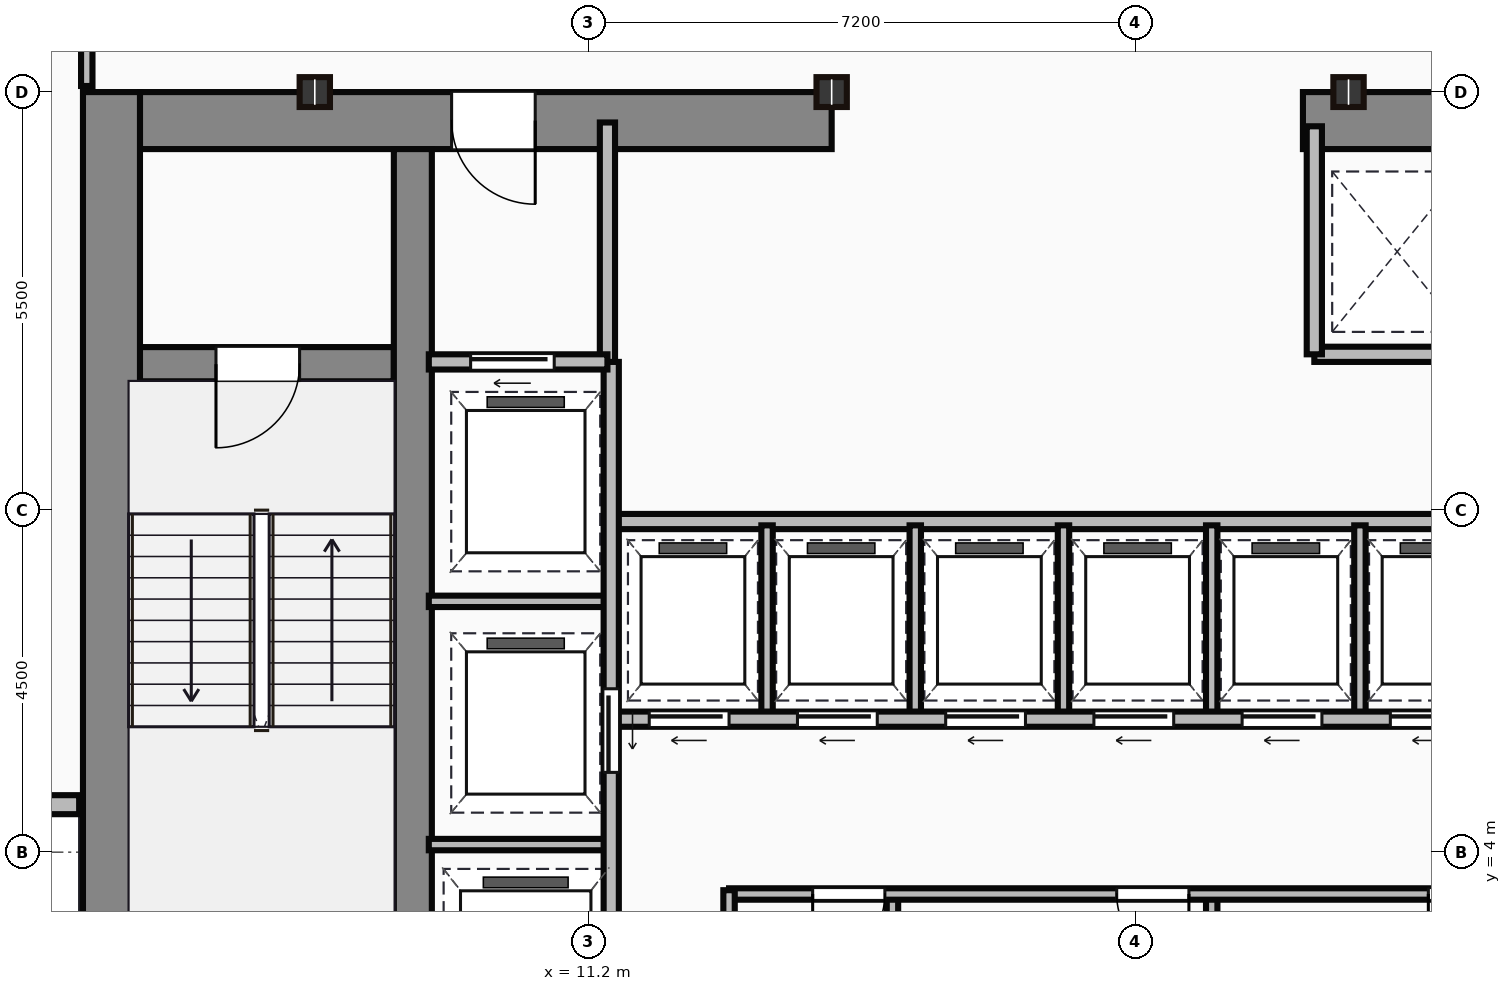
"""IFC4 building model, lengths in metres.
Left out: names, types, materials, properties, quantities, classifications, styles, units other than length and angle.
Written with IfcOpenShell. Run it as: python <this file> out.ifc"""

import sys

from ifc_helpers import new_model, si_unit, direction, frame, frame_2d, origin, origin_2d, place, context, subcontext, project, spatial, rectangle, i_section, extrude, source, transform, mapped, element, fill, save


model = new_model("IFC4")
c1 = context("Model", 3, precision=1e-05, world=origin(), true_north=direction((0.0, 1.0)))
c2 = subcontext(c1, "Body", "Model", "MODEL_VIEW")
j1 = project(units=[si_unit("LENGTHUNIT", "METRE"), si_unit("PLANEANGLEUNIT", "RADIAN")], contexts=[c1])
p1 = place(None, origin())
s1 = spatial("IfcSite", under=j1, at=p1, CompositionType="ELEMENT")
p2 = place(p1, origin())
s2 = spatial("IfcBuilding", under=s1, at=p2, CompositionType="ELEMENT")
p3 = place(p2, frame((0.0, 0.0, 114.2)))
s3 = spatial("IfcBuildingStorey", under=s2, at=p3, CompositionType="ELEMENT", Elevation=114.2)
m1 = source(origin(), c2, "Body", "SweptSolid", [
    extrude(rectangle(XDim=13.1, YDim=0.75, at=frame_2d((6.55, 0.0))), origin(), (0.0, 0.0, 1.0), 3.65),
])
p4 = place(p3, frame((4.925, 0.9, 0.0), z_axis=(0.0, 0.0, 1.0), x_axis=(0.0, 1.0, 0.0)))
e1 = element("IfcWall", 1, at=p4, inside=s3, PredefinedType="SHEAR", context=c2, shape_type="MappedRepresentation", body=[
    mapped(m1, transform((0.0, 0.0, 0.0))),
])
m2 = source(origin(), c2, "Body", "SweptSolid", [
    extrude(rectangle(XDim=9.1, YDim=0.75, at=frame_2d((4.55, 0.0))), origin(), (0.0, 0.0, 1.0), 3.65),
])
p5 = place(p3, frame((5.3, 13.625, 0.0), z_axis=(0.0, 0.0, 1.0), x_axis=(1.0, 0.0, 0.0)))
e2 = element("IfcWall", 2, at=p5, inside=s3, PredefinedType="SHEAR", context=c2, shape_type="MappedRepresentation", body=[
    mapped(m2, transform((0.0, 0.0, 0.0))),
])
p6 = place(p5, frame((4.1, 0.0, 0.0)))
e3 = element("IfcOpeningElement", 3, at=p6, cuts=e2, PredefinedType="OPENING", context=c2, shape_type="SweptSolid", body=[
    extrude(rectangle(XDim=1.1, YDim=2.15, at=frame_2d((0.55, 1.075))), frame((0.0, 0.385, 0.0), z_axis=(0.0, -1.0, 0.0), x_axis=(1.0, 0.0, 0.0)), (0.0, 0.0, 1.0), 0.77),
])
m3 = source(origin(), c2, "Body", "SweptSolid", [
    extrude(rectangle(XDim=12.6, YDim=0.75, at=frame_2d((6.3, 0.0))), origin(), (0.0, 0.0, 1.0), 3.65),
])
p7 = place(p3, frame((20.6, 13.625, 0.0), z_axis=(0.0, 0.0, 1.0), x_axis=(1.0, 0.0, 0.0)))
e4 = element("IfcWall", 4, at=p7, inside=s3, PredefinedType="SHEAR", context=c2, shape_type="MappedRepresentation", body=[
    mapped(m3, transform((0.0, 0.0, 0.0))),
])
p8 = place(p7, frame((9.25, 0.0, 0.0)))
e5 = element("IfcOpeningElement", 5, at=p8, cuts=e4, PredefinedType="OPENING", context=c2, shape_type="SweptSolid", body=[
    extrude(rectangle(XDim=1.1, YDim=2.15, at=frame_2d((0.55, 1.075))), frame((0.0, 0.385, 0.0), z_axis=(0.0, -1.0, 0.0), x_axis=(1.0, 0.0, 0.0)), (0.0, 0.0, 1.0), 0.77),
])
m4 = source(origin(), c2, "Body", "SweptSolid", [
    extrude(rectangle(XDim=12.35, YDim=0.5, at=frame_2d((6.175, 0.0))), origin(), (0.0, 0.0, 1.0), 3.65),
])
p9 = place(p3, frame((8.89, 0.9, 0.0), z_axis=(0.0, 0.0, 1.0), x_axis=(0.0, 1.0, 0.0)))
e6 = element("IfcWall", 6, at=p9, inside=s3, PredefinedType="SHEAR", context=c2, shape_type="MappedRepresentation", body=[
    mapped(m4, transform((0.0, 0.0, 0.0))),
])
m5 = source(origin(), c2, "Body", "SweptSolid", [
    extrude(rectangle(XDim=3.39, YDim=0.45, at=frame_2d((1.695, 0.0))), origin(), (0.0, 0.0, 1.0), 3.65),
])
p10 = place(p3, frame((5.25, 10.42, 0.0), z_axis=(0.0, 0.0, 1.0), x_axis=(1.0, 0.0, 0.0)))
e7 = element("IfcWall", 7, at=p10, inside=s3, PredefinedType="SHEAR", context=c2, shape_type="MappedRepresentation", body=[
    mapped(m5, transform((0.0, 0.0, 0.0))),
])
p11 = place(p10, frame((1.05, 0.0, 0.0)))
e8 = element("IfcOpeningElement", 8, at=p11, cuts=e7, PredefinedType="OPENING", context=c2, shape_type="SweptSolid", body=[
    extrude(rectangle(XDim=1.1, YDim=2.15, at=frame_2d((0.55, 1.075))), frame((0.0, 0.235, 0.0), z_axis=(0.0, -1.0, 0.0), x_axis=(1.0, 0.0, 0.0)), (0.0, 0.0, 1.0), 0.47),
])
m6 = source(origin(), c2, "Body", "SweptSolid", [
    extrude(i_section(OverallWidth=0.399, OverallDepth=0.393, WebThickness=0.023, FlangeThickness=0.037, at=origin_2d()), origin(), (0.0, 0.0, 1.0), 3.65),
])
for number, where, z_axis, x_axis in (
    (9, (7.6, 14.0, 0.0), (0.0, 0.0, 1.0), (1.0, 0.0, 0.0)),
    (10, (14.4, 14.0, 0.0), (0.0, 0.0, 1.0), (1.0, 0.0, 0.0)),
    (11, (21.2, 14.0, 0.0), (0.0, 0.0, 1.0), (1.0, 0.0, 0.0)),
):
    element("IfcColumn", number, at=place(p3, frame(where, z_axis=z_axis, x_axis=x_axis)), inside=s3, PredefinedType="COLUMN", context=c2, shape_type="MappedRepresentation", body=[
        mapped(m6, transform((0.0, 0.0, 0.0))),
    ])
m7 = source(origin(), c2, "Body", "SweptSolid", [
    extrude(rectangle(XDim=4.5, YDim=0.25, at=frame_2d((2.25, 0.0))), origin(), (0.0, 0.0, 1.0), 3.4),
])
p12 = place(p3, frame((0.0, 4.625, 0.0), z_axis=(0.0, 0.0, 1.0), x_axis=(1.0, 0.0, 0.0)))
e12 = element("IfcWall", 12, at=p12, inside=s3, PredefinedType="STANDARD", context=c2, shape_type="MappedRepresentation", body=[
    mapped(m7, transform((0.0, 0.0, 0.0))),
])
m8 = source(origin(), c2, "Body", "SweptSolid", [
    extrude(rectangle(XDim=3.18, YDim=0.2, at=frame_2d((1.59, 0.0))), origin(), (0.0, 0.0, 1.0), 3.4),
])
p13 = place(p3, frame((11.45, 10.42, 0.0), z_axis=(0.0, 0.0, 1.0), x_axis=(0.0, 1.0, 0.0)))
e13 = element("IfcWall", 13, at=p13, inside=s3, PredefinedType="PARTITIONING", context=c2, shape_type="MappedRepresentation", body=[
    mapped(m8, transform((0.0, 0.0, 0.0))),
])
m9 = source(origin(), c2, "Body", "SweptSolid", [
    extrude(rectangle(XDim=2.35, YDim=0.2, at=frame_2d((1.175, 0.0))), origin(), (0.0, 0.0, 1.0), 3.4),
])
p14 = place(p3, frame((9.1, 10.45, 0.0), z_axis=(0.0, 0.0, 1.0), x_axis=(1.0, 0.0, 0.0)))
e14 = element("IfcWall", 14, at=p14, inside=s3, PredefinedType="PARTITIONING", context=c2, shape_type="MappedRepresentation", body=[
    mapped(m9, transform((0.0, 0.0, 0.0))),
])
p15 = place(p14, frame((0.55, 0.0, 0.0)))
e15 = element("IfcOpeningElement", 15, at=p15, cuts=e14, PredefinedType="OPENING", context=c2, shape_type="SweptSolid", body=[
    extrude(rectangle(XDim=1.1, YDim=2.15, at=frame_2d((0.55, 1.075))), frame((0.0, 0.11, 0.0), z_axis=(0.0, -1.0, 0.0), x_axis=(1.0, 0.0, 0.0)), (0.0, 0.0, 1.0), 0.22),
])
m10 = source(origin(), c2, "Body", "SweptSolid", [
    extrude(rectangle(XDim=9.6, YDim=0.2, at=frame_2d((4.8, 0.0))), origin(), (0.0, 0.0, 1.0), 3.4),
])
p16 = place(p3, frame((11.5, 0.85, 0.0), z_axis=(0.0, 0.0, 1.0), x_axis=(0.0, 1.0, 0.0)))
e16 = element("IfcWall", 16, at=p16, inside=s3, PredefinedType="PARTITIONING", context=c2, shape_type="MappedRepresentation", body=[
    mapped(m10, transform((0.0, 0.0, 0.0))),
])
p17 = place(p16, frame((4.2, 0.0, 0.0)))
e17 = element("IfcOpeningElement", 17, at=p17, cuts=e16, PredefinedType="OPENING", context=c2, shape_type="SweptSolid", body=[
    extrude(rectangle(XDim=1.1, YDim=2.15, at=frame_2d((0.55, 1.075))), frame((0.0, 0.11, 0.0), z_axis=(0.0, -1.0, 0.0), x_axis=(1.0, 0.0, 0.0)), (0.0, 0.0, 1.0), 0.22),
])
p18 = place(p16, frame((0.9, 0.0, 0.0)))
e18 = element("IfcOpeningElement", 18, at=p18, cuts=e16, PredefinedType="OPENING", context=c2, shape_type="SweptSolid", body=[
    extrude(rectangle(XDim=1.2, YDim=2.15, at=frame_2d((0.6, 1.075))), frame((0.0, 0.11, 0.0), z_axis=(0.0, -1.0, 0.0), x_axis=(1.0, 0.0, 0.0)), (0.0, 0.0, 1.0), 0.22),
])
m11 = source(origin(), c2, "Body", "SweptSolid", [
    extrude(rectangle(XDim=2.4, YDim=0.15, at=frame_2d((1.2, 0.0))), origin(), (0.0, 0.0, 1.0), 3.4),
])
for number, where, z_axis, x_axis in (
    (19, (9.1, 4.1, 0.0), (0.0, 0.0, 1.0), (1.0, 0.0, 0.0)),
    (20, (9.1, 7.3, 0.0), (0.0, 0.0, 1.0), (1.0, 0.0, 0.0)),
):
    element("IfcWall", number, at=place(p3, frame(where, z_axis=z_axis, x_axis=x_axis)), inside=s3, PredefinedType="PARTITIONING", context=c2, shape_type="MappedRepresentation", body=[
        mapped(m11, transform((0.0, 0.0, 0.0))),
    ])
m12 = source(origin(), c2, "Body", "SweptSolid", [
    extrude(rectangle(XDim=2.65, YDim=0.15, at=frame_2d((1.325, 0.0))), origin(), (0.0, 0.0, 1.0), 3.4),
])
p19 = place(p3, frame((13.05, 0.85, 0.0), z_axis=(0.0, 0.0, 1.0), x_axis=(0.0, 1.0, 0.0)))
e21 = element("IfcWall", 21, at=p19, inside=s3, PredefinedType="PARTITIONING", context=c2, shape_type="MappedRepresentation", body=[
    mapped(m12, transform((0.0, 0.0, 0.0))),
])
m13 = source(origin(), c2, "Body", "SweptSolid", [
    extrude(rectangle(XDim=10.35, YDim=0.15, at=frame_2d((5.175, 0.0))), origin(), (0.0, 0.0, 1.0), 3.4),
])
p20 = place(p3, frame((13.05, 3.45, 0.0), z_axis=(0.0, 0.0, 1.0), x_axis=(1.0, 0.0, 0.0)))
e22 = element("IfcWall", 22, at=p20, inside=s3, PredefinedType="PARTITIONING", context=c2, shape_type="MappedRepresentation", body=[
    mapped(m13, transform((0.0, 0.0, 0.0))),
])
p21 = place(p20, frame((1.1, 0.0, 0.0)))
e23 = element("IfcOpeningElement", 23, at=p21, cuts=e22, PredefinedType="OPENING", context=c2, shape_type="SweptSolid", body=[
    extrude(rectangle(XDim=0.95, YDim=2.15, at=frame_2d((0.475, 1.075))), frame((0.0, 0.085, 0.0), z_axis=(0.0, -1.0, 0.0), x_axis=(1.0, 0.0, 0.0)), (0.0, 0.0, 1.0), 0.17),
])
p22 = place(p20, frame((5.1, 0.0, 0.0)))
e24 = element("IfcOpeningElement", 24, at=p22, cuts=e22, PredefinedType="OPENING", context=c2, shape_type="SweptSolid", body=[
    extrude(rectangle(XDim=0.95, YDim=2.15, at=frame_2d((0.475, 1.075))), frame((0.0, 0.085, 0.0), z_axis=(0.0, -1.0, 0.0), x_axis=(1.0, 0.0, 0.0)), (0.0, 0.0, 1.0), 0.17),
])
p23 = place(p20, frame((9.2, 0.0, 0.0)))
e25 = element("IfcOpeningElement", 25, at=p23, cuts=e22, PredefinedType="OPENING", context=c2, shape_type="SweptSolid", body=[
    extrude(rectangle(XDim=0.95, YDim=2.15, at=frame_2d((0.475, 1.075))), frame((0.0, 0.085, 0.0), z_axis=(0.0, -1.0, 0.0), x_axis=(1.0, 0.0, 0.0)), (0.0, 0.0, 1.0), 0.17),
])
m14 = source(origin(), c2, "Body", "SweptSolid", [
    extrude(rectangle(XDim=2.6, YDim=0.15, at=frame_2d((1.3, 0.0))), origin(), (0.0, 0.0, 1.0), 3.4),
])
for number, where, z_axis, x_axis in (
    (26, (15.2, 0.85, 0.0), (0.0, 0.0, 1.0), (0.0, 1.0, 0.0)),
    (27, (19.4, 0.85, 0.0), (0.0, 0.0, 1.0), (0.0, 1.0, 0.0)),
):
    element("IfcWall", number, at=place(p3, frame(where, z_axis=z_axis, x_axis=x_axis)), inside=s3, PredefinedType="PARTITIONING", context=c2, shape_type="MappedRepresentation", body=[
        mapped(m14, transform((0.0, 0.0, 0.0))),
    ])
m15 = source(origin(), c2, "Body", "SweptSolid", [
    extrude(rectangle(XDim=11.85, YDim=0.2, at=frame_2d((5.925, 0.0))), origin(), (0.0, 0.0, 1.0), 3.4),
])
p24 = place(p3, frame((11.55, 5.75, 0.0), z_axis=(0.0, 0.0, 1.0), x_axis=(1.0, 0.0, 0.0)))
e28 = element("IfcWall", 28, at=p24, inside=s3, PredefinedType="PARTITIONING", context=c2, shape_type="MappedRepresentation", body=[
    mapped(m15, transform((0.0, 0.0, 0.0))),
])
p25 = place(p24, frame((0.45, 0.0, 0.0)))
e29 = element("IfcOpeningElement", 29, at=p25, cuts=e28, PredefinedType="OPENING", context=c2, shape_type="SweptSolid", body=[
    extrude(rectangle(XDim=1.05, YDim=2.15, at=frame_2d((0.525, 1.075))), frame((0.0, 0.11, 0.0), z_axis=(0.0, -1.0, 0.0), x_axis=(1.0, 0.0, 0.0)), (0.0, 0.0, 1.0), 0.22),
])
p26 = place(p24, frame((2.4, 0.0, 0.0)))
e30 = element("IfcOpeningElement", 30, at=p26, cuts=e28, PredefinedType="OPENING", context=c2, shape_type="SweptSolid", body=[
    extrude(rectangle(XDim=1.05, YDim=2.15, at=frame_2d((0.525, 1.075))), frame((0.0, 0.11, 0.0), z_axis=(0.0, -1.0, 0.0), x_axis=(1.0, 0.0, 0.0)), (0.0, 0.0, 1.0), 0.22),
])
p27 = place(p24, frame((4.35, 0.0, 0.0)))
e31 = element("IfcOpeningElement", 31, at=p27, cuts=e28, PredefinedType="OPENING", context=c2, shape_type="SweptSolid", body=[
    extrude(rectangle(XDim=1.05, YDim=2.15, at=frame_2d((0.525, 1.075))), frame((0.0, 0.11, 0.0), z_axis=(0.0, -1.0, 0.0), x_axis=(1.0, 0.0, 0.0)), (0.0, 0.0, 1.0), 0.22),
])
p28 = place(p24, frame((6.3, 0.0, 0.0)))
e32 = element("IfcOpeningElement", 32, at=p28, cuts=e28, PredefinedType="OPENING", context=c2, shape_type="SweptSolid", body=[
    extrude(rectangle(XDim=1.05, YDim=2.15, at=frame_2d((0.525, 1.075))), frame((0.0, 0.11, 0.0), z_axis=(0.0, -1.0, 0.0), x_axis=(1.0, 0.0, 0.0)), (0.0, 0.0, 1.0), 0.22),
])
p29 = place(p24, frame((8.25, 0.0, 0.0)))
e33 = element("IfcOpeningElement", 33, at=p29, cuts=e28, PredefinedType="OPENING", context=c2, shape_type="SweptSolid", body=[
    extrude(rectangle(XDim=1.05, YDim=2.15, at=frame_2d((0.525, 1.075))), frame((0.0, 0.11, 0.0), z_axis=(0.0, -1.0, 0.0), x_axis=(1.0, 0.0, 0.0)), (0.0, 0.0, 1.0), 0.22),
])
p30 = place(p24, frame((10.2, 0.0, 0.0)))
e34 = element("IfcOpeningElement", 34, at=p30, cuts=e28, PredefinedType="OPENING", context=c2, shape_type="SweptSolid", body=[
    extrude(rectangle(XDim=1.05, YDim=2.15, at=frame_2d((0.525, 1.075))), frame((0.0, 0.11, 0.0), z_axis=(0.0, -1.0, 0.0), x_axis=(1.0, 0.0, 0.0)), (0.0, 0.0, 1.0), 0.22),
])
p31 = place(p3, frame((11.55, 8.35, 0.0), z_axis=(0.0, 0.0, 1.0), x_axis=(1.0, 0.0, 0.0)))
e35 = element("IfcWall", 35, at=p31, inside=s3, PredefinedType="PARTITIONING", context=c2, shape_type="MappedRepresentation", body=[
    mapped(m15, transform((0.0, 0.0, 0.0))),
])
m16 = source(origin(), c2, "Body", "SweptSolid", [
    extrude(rectangle(XDim=2.5, YDim=0.15, at=frame_2d((1.25, 0.0))), origin(), (0.0, 0.0, 1.0), 3.4),
])
for number, where, z_axis, x_axis in (
    (36, (13.55, 5.8, 0.0), (0.0, 0.0, 1.0), (0.0, 1.0, 0.0)),
    (37, (15.5, 5.8, 0.0), (0.0, 0.0, 1.0), (0.0, 1.0, 0.0)),
    (38, (17.45, 5.8, 0.0), (0.0, 0.0, 1.0), (0.0, 1.0, 0.0)),
    (39, (19.4, 5.8, 0.0), (0.0, 0.0, 1.0), (0.0, 1.0, 0.0)),
    (40, (21.35, 5.8, 0.0), (0.0, 0.0, 1.0), (0.0, 1.0, 0.0)),
):
    element("IfcWall", number, at=place(p3, frame(where, z_axis=z_axis, x_axis=x_axis)), inside=s3, PredefinedType="PARTITIONING", context=c2, shape_type="MappedRepresentation", body=[
        mapped(m16, transform((0.0, 0.0, 0.0))),
    ])
m17 = source(origin(), c2, "Body", "SweptSolid", [
    extrude(rectangle(XDim=8.8, YDim=0.2, at=frame_2d((4.4, 0.0))), origin(), (0.0, 0.0, 1.0), 3.4),
])
p32 = place(p3, frame((20.75, 10.55, 0.0), z_axis=(0.0, 0.0, 1.0), x_axis=(1.0, 0.0, 0.0)))
e41 = element("IfcWall", 41, at=p32, inside=s3, PredefinedType="PARTITIONING", context=c2, shape_type="MappedRepresentation", body=[
    mapped(m17, transform((0.0, 0.0, 0.0))),
])
m18 = source(origin(), c2, "Body", "SweptSolid", [
    extrude(rectangle(XDim=3.0, YDim=0.2, at=frame_2d((1.5, 0.0))), origin(), (0.0, 0.0, 1.0), 3.4),
])
p33 = place(p3, frame((20.75, 10.55, 0.0), z_axis=(0.0, 0.0, 1.0), x_axis=(0.0, 1.0, 0.0)))
e42 = element("IfcWall", 42, at=p33, inside=s3, PredefinedType="PARTITIONING", context=c2, shape_type="MappedRepresentation", body=[
    mapped(m18, transform((0.0, 0.0, 0.0))),
])
m19 = source(origin(), c2, "Body", "SweptSolid", [
    extrude(rectangle(XDim=2.22, YDim=0.15, at=frame_2d((1.11, 0.0))), origin(), (0.0, 0.0, 1.0), 3.4),
])
p34 = place(p3, frame((4.6, 14.08, 0.0), z_axis=(0.0, 0.0, 1.0), x_axis=(0.0, 1.0, 0.0)))
e43 = element("IfcWall", 43, at=p34, inside=s3, PredefinedType="PARTITIONING", context=c2, shape_type="MappedRepresentation", body=[
    mapped(m19, transform((0.0, 0.0, 0.0))),
])
m20 = source(origin(), c2, "Body", "SweptSolid", [
    extrude(rectangle(XDim=1.1, YDim=2.15, at=frame_2d((0.55, 1.075))), frame((0.0, 0.025, 0.0), z_axis=(0.0, -1.0, 0.0), x_axis=(1.0, 0.0, 0.0)), (0.0, 0.0, 1.0), 0.05),
])
p35 = place(p11, frame((1.1, 0.0, 0.0), z_axis=(0.0, 0.0, 1.0), x_axis=(-1.0, 0.0, 0.0)))
e44 = element("IfcDoor", 44, at=p35, inside=s3, OperationType="SINGLE_SWING_LEFT", PredefinedType="DOOR", context=c2, shape_type="MappedRepresentation", body=[
    mapped(m20, transform((0.0, 0.0, 0.0))),
])
fill(e8, e44)
p36 = place(p6, origin())
e45 = element("IfcDoor", 45, at=p36, inside=s3, OperationType="SINGLE_SWING_RIGHT", PredefinedType="DOOR", context=c2, shape_type="MappedRepresentation", body=[
    mapped(m20, transform((0.0, 0.0, 0.0))),
])
fill(e3, e45)
p37 = place(p15, origin())
e46 = element("IfcDoor", 46, at=p37, inside=s3, OperationType="SLIDING_TO_LEFT", PredefinedType="DOOR", context=c2, shape_type="MappedRepresentation", body=[
    mapped(m20, transform((0.0, 0.0, 0.0))),
])
fill(e15, e46)
p38 = place(p17, frame((1.1, 0.0, 0.0), z_axis=(0.0, 0.0, 1.0), x_axis=(-1.0, 0.0, 0.0)))
e47 = element("IfcDoor", 47, at=p38, inside=s3, OperationType="SLIDING_TO_LEFT", PredefinedType="DOOR", context=c2, shape_type="MappedRepresentation", body=[
    mapped(m20, transform((0.0, 0.0, 0.0))),
])
fill(e17, e47)
m21 = source(origin(), c2, "Body", "SweptSolid", [
    extrude(rectangle(XDim=0.95, YDim=2.15, at=frame_2d((0.475, 1.075))), frame((0.0, 0.025, 0.0), z_axis=(0.0, -1.0, 0.0), x_axis=(1.0, 0.0, 0.0)), (0.0, 0.0, 1.0), 0.05),
])
p39 = place(p21, origin())
e48 = element("IfcDoor", 48, at=p39, inside=s3, OperationType="SINGLE_SWING_LEFT", PredefinedType="DOOR", context=c2, shape_type="MappedRepresentation", body=[
    mapped(m21, transform((0.0, 0.0, 0.0))),
])
fill(e23, e48)
p40 = place(p22, origin())
e49 = element("IfcDoor", 49, at=p40, inside=s3, OperationType="SINGLE_SWING_RIGHT", PredefinedType="DOOR", context=c2, shape_type="MappedRepresentation", body=[
    mapped(m21, transform((0.0, 0.0, 0.0))),
])
fill(e24, e49)
p41 = place(p23, origin())
e50 = element("IfcDoor", 50, at=p41, inside=s3, OperationType="SINGLE_SWING_LEFT", PredefinedType="DOOR", context=c2, shape_type="MappedRepresentation", body=[
    mapped(m21, transform((0.0, 0.0, 0.0))),
])
fill(e25, e50)
m22 = source(origin(), c2, "Body", "SweptSolid", [
    extrude(rectangle(XDim=1.05, YDim=2.15, at=frame_2d((0.525, 1.075))), frame((0.0, 0.025, 0.0), z_axis=(0.0, -1.0, 0.0), x_axis=(1.0, 0.0, 0.0)), (0.0, 0.0, 1.0), 0.05),
])
p42 = place(p25, frame((1.05, 0.0, 0.0), z_axis=(0.0, 0.0, 1.0), x_axis=(-1.0, 0.0, 0.0)))
e51 = element("IfcDoor", 51, at=p42, inside=s3, OperationType="SLIDING_TO_LEFT", PredefinedType="DOOR", context=c2, shape_type="MappedRepresentation", body=[
    mapped(m22, transform((0.0, 0.0, 0.0))),
])
fill(e29, e51)
p43 = place(p26, frame((1.05, 0.0, 0.0), z_axis=(0.0, 0.0, 1.0), x_axis=(-1.0, 0.0, 0.0)))
e52 = element("IfcDoor", 52, at=p43, inside=s3, OperationType="SLIDING_TO_LEFT", PredefinedType="DOOR", context=c2, shape_type="MappedRepresentation", body=[
    mapped(m22, transform((0.0, 0.0, 0.0))),
])
fill(e30, e52)
p44 = place(p27, frame((1.05, 0.0, 0.0), z_axis=(0.0, 0.0, 1.0), x_axis=(-1.0, 0.0, 0.0)))
e53 = element("IfcDoor", 53, at=p44, inside=s3, OperationType="SLIDING_TO_LEFT", PredefinedType="DOOR", context=c2, shape_type="MappedRepresentation", body=[
    mapped(m22, transform((0.0, 0.0, 0.0))),
])
fill(e31, e53)
p45 = place(p28, frame((1.05, 0.0, 0.0), z_axis=(0.0, 0.0, 1.0), x_axis=(-1.0, 0.0, 0.0)))
e54 = element("IfcDoor", 54, at=p45, inside=s3, OperationType="SLIDING_TO_LEFT", PredefinedType="DOOR", context=c2, shape_type="MappedRepresentation", body=[
    mapped(m22, transform((0.0, 0.0, 0.0))),
])
fill(e32, e54)
p46 = place(p29, frame((1.05, 0.0, 0.0), z_axis=(0.0, 0.0, 1.0), x_axis=(-1.0, 0.0, 0.0)))
e55 = element("IfcDoor", 55, at=p46, inside=s3, OperationType="SLIDING_TO_LEFT", PredefinedType="DOOR", context=c2, shape_type="MappedRepresentation", body=[
    mapped(m22, transform((0.0, 0.0, 0.0))),
])
fill(e33, e55)
p47 = place(p30, frame((1.05, 0.0, 0.0), z_axis=(0.0, 0.0, 1.0), x_axis=(-1.0, 0.0, 0.0)))
e56 = element("IfcDoor", 56, at=p47, inside=s3, OperationType="SLIDING_TO_LEFT", PredefinedType="DOOR", context=c2, shape_type="MappedRepresentation", body=[
    mapped(m22, transform((0.0, 0.0, 0.0))),
])
fill(e34, e56)
save(model, sys.argv[1])
